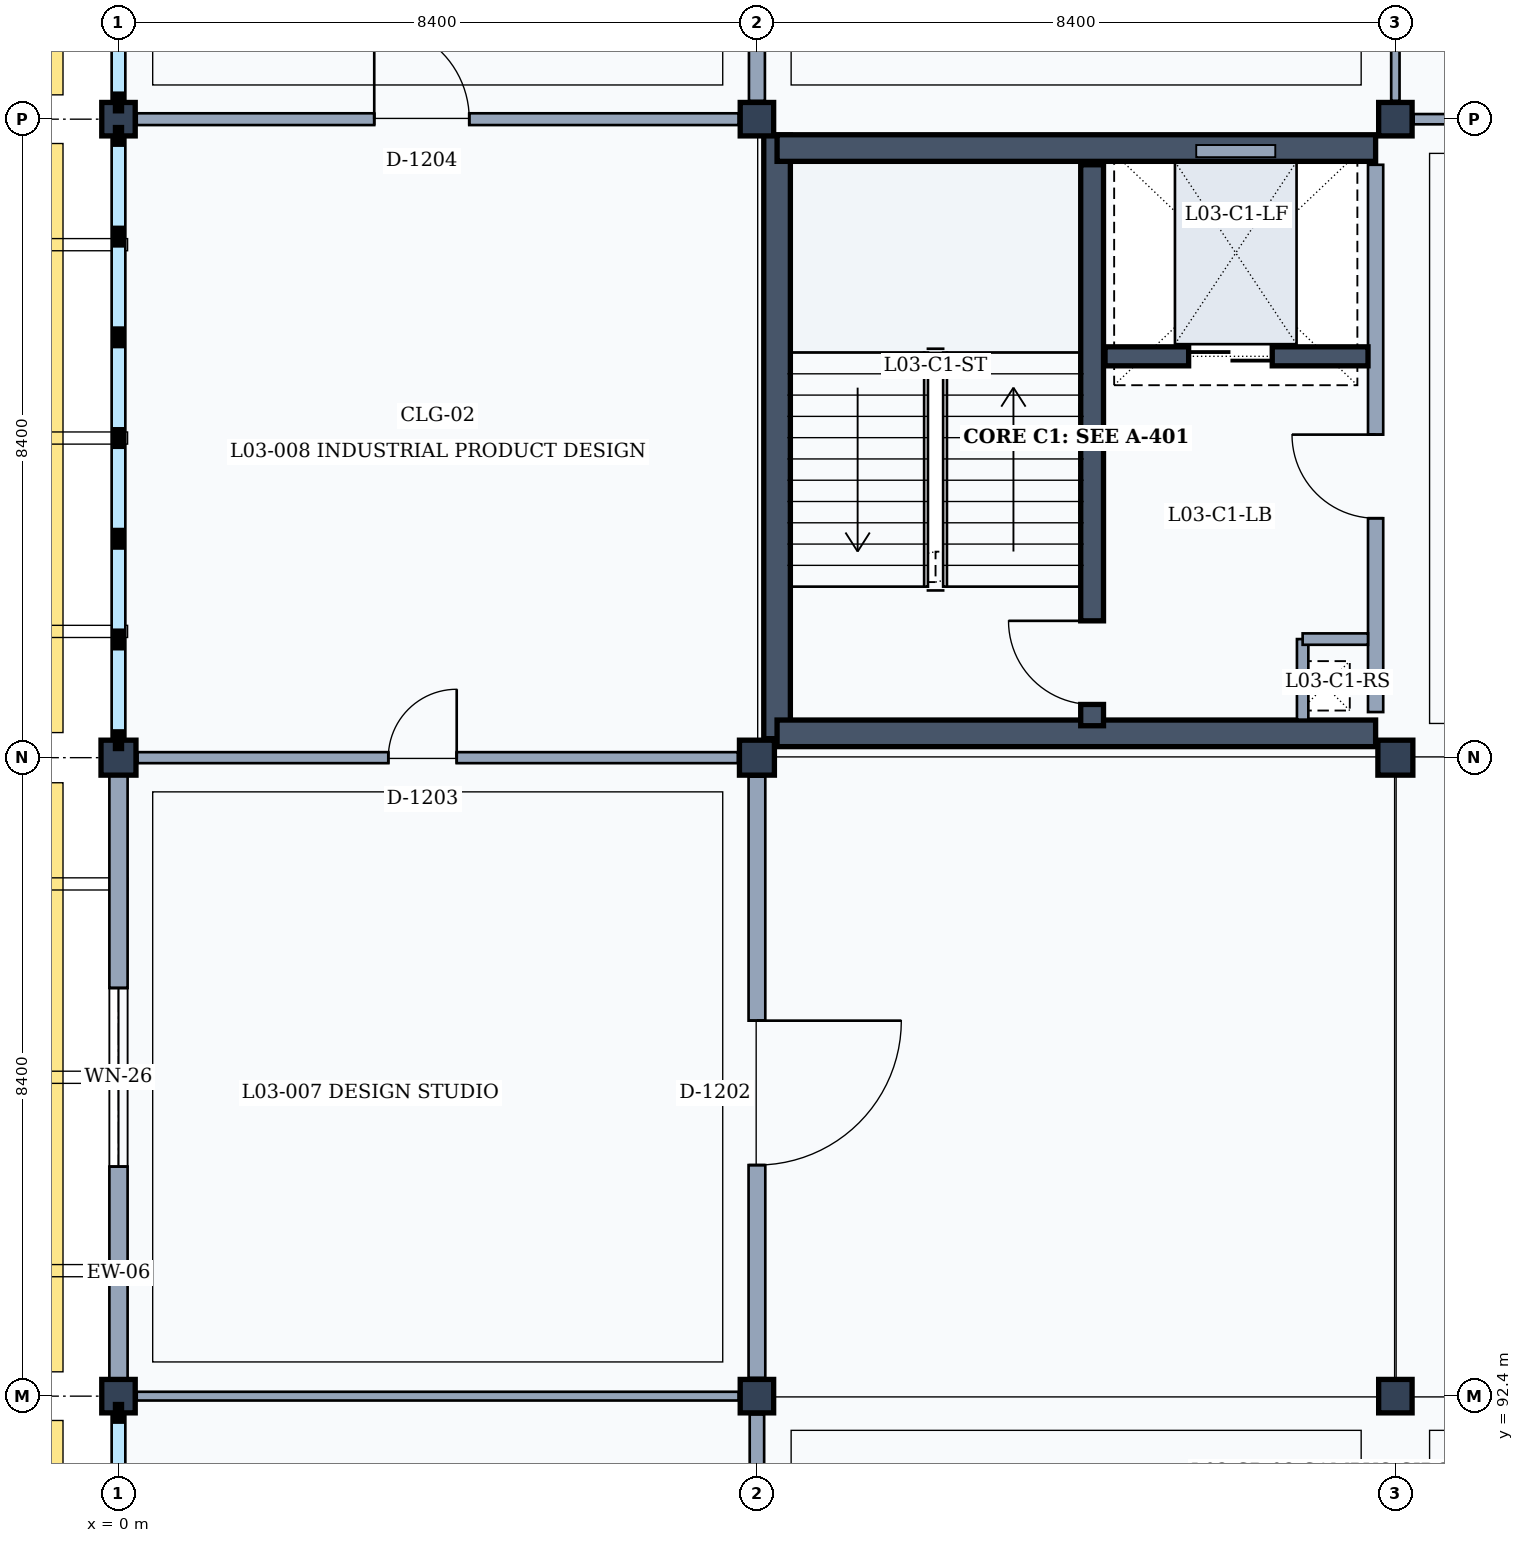
"""IFC4 building model, lengths in metres.
Left out: names, types, materials, properties, quantities, classifications, styles, units other than length and angle.
Written with IfcOpenShell. Run it as: python <this file> out.ifc"""

import sys

from ifc_helpers import new_model, si_unit, direction, frame, frame_2d, origin, origin_2d, place, context, subcontext, project, spatial, rectangle, extrude, element, fill, save


model = new_model("IFC4")
c1 = context("Model", 3, precision=1e-05, world=origin(), true_north=direction((0.0, 1.0)))
c2 = subcontext(c1, "Body", "Model", "MODEL_VIEW")
j1 = project(units=[si_unit("LENGTHUNIT", "METRE"), si_unit("PLANEANGLEUNIT", "RADIAN")], contexts=[c1])
p1 = place(None, origin())
s1 = spatial("IfcSite", under=j1, at=p1, CompositionType="ELEMENT")
p2 = place(p1, origin())
s2 = spatial("IfcBuilding", under=s1, at=p2, CompositionType="ELEMENT")
p3 = place(p2, frame((0.0, 0.0, 13.8)))
s3 = spatial("IfcBuildingStorey", under=s2, at=p3, CompositionType="ELEMENT", Elevation=13.8)
p4 = place(p3, frame((0.0, 92.4, 0.0), z_axis=(0.0, 0.0, 1.0), x_axis=(1.0, 0.0, 0.0)))
e1 = element("IfcColumn", 1, at=p4, inside=s3, PredefinedType="COLUMN", context=c2, shape_type="SweptSolid", body=[
    extrude(rectangle(XDim=0.44, YDim=0.44, at=origin_2d()), origin(), (0.0, 0.0, 1.0), 4.2),
])
p5 = place(p3, frame((0.0, 100.8, 0.0), z_axis=(0.0, 0.0, 1.0), x_axis=(1.0, 0.0, 0.0)))
e2 = element("IfcColumn", 2, at=p5, inside=s3, PredefinedType="COLUMN", context=c2, shape_type="SweptSolid", body=[
    extrude(rectangle(XDim=0.46, YDim=0.46, at=origin_2d()), origin(), (0.0, 0.0, 1.0), 4.2),
])
for number, where, z_axis, x_axis in (
    (3, (0.0, 109.2, 0.0), (0.0, 0.0, 1.0), (1.0, 0.0, 0.0)),
    (4, (8.4, 92.4, 0.0), (0.0, 0.0, 1.0), (1.0, 0.0, 0.0)),
):
    element("IfcColumn", number, at=place(p3, frame(where, z_axis=z_axis, x_axis=x_axis)), inside=s3, PredefinedType="COLUMN", context=c2, shape_type="SweptSolid", body=[
        extrude(rectangle(XDim=0.44, YDim=0.44, at=origin_2d()), origin(), (0.0, 0.0, 1.0), 4.2),
    ])
p6 = place(p3, frame((8.4, 100.8, 0.0), z_axis=(0.0, 0.0, 1.0), x_axis=(1.0, 0.0, 0.0)))
e5 = element("IfcColumn", 5, at=p6, inside=s3, PredefinedType="COLUMN", context=c2, shape_type="SweptSolid", body=[
    extrude(rectangle(XDim=0.46, YDim=0.46, at=origin_2d()), origin(), (0.0, 0.0, 1.0), 4.2),
])
for number, where, z_axis, x_axis in (
    (6, (8.4, 109.2, 0.0), (0.0, 0.0, 1.0), (1.0, 0.0, 0.0)),
    (7, (16.8, 92.4, 0.0), (0.0, 0.0, 1.0), (1.0, 0.0, 0.0)),
):
    element("IfcColumn", number, at=place(p3, frame(where, z_axis=z_axis, x_axis=x_axis)), inside=s3, PredefinedType="COLUMN", context=c2, shape_type="SweptSolid", body=[
        extrude(rectangle(XDim=0.44, YDim=0.44, at=origin_2d()), origin(), (0.0, 0.0, 1.0), 4.2),
    ])
p7 = place(p3, frame((16.8, 100.8, 0.0), z_axis=(0.0, 0.0, 1.0), x_axis=(1.0, 0.0, 0.0)))
e8 = element("IfcColumn", 8, at=p7, inside=s3, PredefinedType="COLUMN", context=c2, shape_type="SweptSolid", body=[
    extrude(rectangle(XDim=0.46, YDim=0.46, at=origin_2d()), origin(), (0.0, 0.0, 1.0), 4.2),
])
p8 = place(p3, frame((16.8, 109.2, 0.0), z_axis=(0.0, 0.0, 1.0), x_axis=(1.0, 0.0, 0.0)))
e9 = element("IfcColumn", 9, at=p8, inside=s3, PredefinedType="COLUMN", context=c2, shape_type="SweptSolid", body=[
    extrude(rectangle(XDim=0.44, YDim=0.44, at=origin_2d()), origin(), (0.0, 0.0, 1.0), 4.2),
])
p9 = place(p3, frame((0.0, 92.62, 0.0), z_axis=(0.0, 0.0, 1.0), x_axis=(0.0, 1.0, 0.0)))
e10 = element("IfcWall", 10, at=p9, inside=s3, PredefinedType="SOLIDWALL", context=c2, shape_type="SweptSolid", body=[
    extrude(rectangle(XDim=7.95, YDim=0.24, at=frame_2d((3.975, 0.0))), origin(), (0.0, 0.0, 1.0), 3.36),
])
p10 = place(p9, frame((2.8, 0.0, 0.9)))
e11 = element("IfcOpeningElement", 11, at=p10, cuts=e10, PredefinedType="OPENING", context=c2, shape_type="SweptSolid", body=[
    extrude(rectangle(XDim=2.35, YDim=1.95, at=frame_2d((1.175, 0.975))), frame((0.0, 0.13, 0.0), z_axis=(0.0, -1.0, 0.0), x_axis=(1.0, 0.0, 0.0)), (0.0, 0.0, 1.0), 0.26),
])
p11 = place(p3, frame((8.665, 101.05, 0.0), z_axis=(0.0, 0.0, 1.0), x_axis=(0.0, 1.0, 0.0)))
e12 = element("IfcWall", 12, at=p11, inside=s3, PredefinedType="SHEAR", context=c2, shape_type="SweptSolid", body=[
    extrude(rectangle(XDim=7.94, YDim=0.35, at=frame_2d((3.97, 0.0))), origin(), (0.0, 0.0, 1.0), 3.98),
])
p12 = place(p3, frame((8.665, 108.82, 0.0), z_axis=(0.0, 0.0, 1.0), x_axis=(1.0, 0.0, 0.0)))
e13 = element("IfcWall", 13, at=p12, inside=s3, PredefinedType="SHEAR", context=c2, shape_type="SweptSolid", body=[
    extrude(rectangle(XDim=7.875, YDim=0.35, at=frame_2d((3.938, 0.0))), origin(), (0.0, 0.0, 1.0), 3.98),
])
p13 = place(p3, frame((16.54, 108.6, 0.0), z_axis=(0.0, 0.0, 1.0), x_axis=(0.0, -1.0, 0.0)))
e14 = element("IfcWall", 14, at=p13, inside=s3, PredefinedType="PARTITIONING", context=c2, shape_type="SweptSolid", body=[
    extrude(rectangle(XDim=7.2, YDim=0.2, at=frame_2d((3.6, 0.0))), origin(), (0.0, 0.0, 1.0), 3.32),
])
p14 = place(p13, frame((3.55, 0.0, 0.0)))
e15 = element("IfcOpeningElement", 15, at=p14, cuts=e14, PredefinedType="OPENING", context=c2, shape_type="SweptSolid", body=[
    extrude(rectangle(XDim=1.1, YDim=2.15, at=frame_2d((0.55, 1.075))), frame((0.0, 0.11, 0.0), z_axis=(0.0, -1.0, 0.0), x_axis=(1.0, 0.0, 0.0)), (0.0, 0.0, 1.0), 0.22),
])
p15 = place(p3, frame((16.54, 101.12, 0.0), z_axis=(0.0, 0.0, 1.0), x_axis=(-1.0, 0.0, 0.0)))
e16 = element("IfcWall", 16, at=p15, inside=s3, PredefinedType="SHEAR", context=c2, shape_type="SweptSolid", body=[
    extrude(rectangle(XDim=7.875, YDim=0.35, at=frame_2d((3.938, 0.0))), origin(), (0.0, 0.0, 1.0), 3.98),
])
p16 = place(p3, frame((12.81, 101.22, 0.0), z_axis=(0.0, 0.0, 1.0), x_axis=(0.0, 1.0, 0.0)))
e17 = element("IfcWall", 17, at=p16, inside=s3, PredefinedType="SHEAR", context=c2, shape_type="SweptSolid", body=[
    extrude(rectangle(XDim=7.38, YDim=0.3, at=frame_2d((3.69, 0.0))), origin(), (0.0, 0.0, 1.0), 3.98),
])
p17 = place(p16, frame((0.28, 0.0, 0.0)))
e18 = element("IfcOpeningElement", 18, at=p17, cuts=e17, PredefinedType="OPENING", context=c2, shape_type="SweptSolid", body=[
    extrude(rectangle(XDim=1.1, YDim=2.15, at=frame_2d((0.55, 1.075))), frame((0.0, 0.16, 0.0), z_axis=(0.0, -1.0, 0.0), x_axis=(1.0, 0.0, 0.0)), (0.0, 0.0, 1.0), 0.32),
])
p18 = place(p3, frame((15.58, 102.36, 0.0), z_axis=(0.0, 0.0, 1.0), x_axis=(0.0, -1.0, 0.0)))
e19 = element("IfcWall", 19, at=p18, inside=s3, PredefinedType="PARTITIONING", context=c2, shape_type="SweptSolid", body=[
    extrude(rectangle(XDim=1.06, YDim=0.15, at=frame_2d((0.53, 0.0))), origin(), (0.0, 0.0, 1.0), 3.32),
])
p19 = place(p3, frame((15.58, 102.36, 0.0), z_axis=(0.0, 0.0, 1.0), x_axis=(1.0, 0.0, 0.0)))
e20 = element("IfcWall", 20, at=p19, inside=s3, PredefinedType="PARTITIONING", context=c2, shape_type="SweptSolid", body=[
    extrude(rectangle(XDim=0.86, YDim=0.15, at=frame_2d((0.43, 0.0))), origin(), (0.0, 0.0, 1.0), 3.32),
])
p20 = place(p3, frame((12.98, 106.08, 0.0), z_axis=(0.0, 0.0, 1.0), x_axis=(1.0, 0.0, 0.0)))
e21 = element("IfcWall", 21, at=p20, inside=s3, PredefinedType="SHEAR", context=c2, shape_type="SweptSolid", body=[
    extrude(rectangle(XDim=3.46, YDim=0.25, at=frame_2d((1.73, 0.0))), origin(), (0.0, 0.0, 1.0), 3.98),
])
p21 = place(p20, frame((1.1, 0.0, 0.0)))
e22 = element("IfcOpeningElement", 22, at=p21, cuts=e21, PredefinedType="OPENING", context=c2, shape_type="SweptSolid", body=[
    extrude(rectangle(XDim=1.1, YDim=2.15, at=frame_2d((0.55, 1.075))), frame((0.0, 0.135, 0.0), z_axis=(0.0, -1.0, 0.0), x_axis=(1.0, 0.0, 0.0)), (0.0, 0.0, 1.0), 0.27),
])
p22 = place(p3, frame((8.4, 84.25, 0.0), z_axis=(0.0, 0.0, 1.0), x_axis=(0.0, 1.0, 0.0)))
e23 = element("IfcWall", 23, at=p22, inside=s3, PredefinedType="PARTITIONING", context=c2, shape_type="SweptSolid", body=[
    extrude(rectangle(XDim=7.91, YDim=0.19, at=frame_2d((3.955, 0.0))), origin(), (0.0, 0.0, 1.0), 3.32),
])
p23 = place(p22, frame((2.9, 0.0, 0.0)))
e24 = element("IfcOpeningElement", 24, at=p23, cuts=e23, PredefinedType="OPENING", context=c2, shape_type="SweptSolid", body=[
    extrude(rectangle(XDim=1.7, YDim=2.3, at=frame_2d((0.85, 1.15))), frame((0.0, 0.105, 0.0), z_axis=(0.0, -1.0, 0.0), x_axis=(1.0, 0.0, 0.0)), (0.0, 0.0, 1.0), 0.21),
])
p24 = place(p3, frame((0.24, 92.4, 0.0), z_axis=(0.0, 0.0, 1.0), x_axis=(1.0, 0.0, 0.0)))
e25 = element("IfcWall", 25, at=p24, inside=s3, PredefinedType="PARTITIONING", context=c2, shape_type="SweptSolid", body=[
    extrude(rectangle(XDim=7.92, YDim=0.115, at=frame_2d((3.96, 0.0))), origin(), (0.0, 0.0, 1.0), 3.32),
])
p25 = place(p3, frame((8.4, 92.64, 0.0), z_axis=(0.0, 0.0, 1.0), x_axis=(0.0, 1.0, 0.0)))
e26 = element("IfcWall", 26, at=p25, inside=s3, PredefinedType="PARTITIONING", context=c2, shape_type="SweptSolid", body=[
    extrude(rectangle(XDim=7.91, YDim=0.22, at=frame_2d((3.955, 0.0))), origin(), (0.0, 0.0, 1.0), 3.32),
])
p26 = place(p25, frame((2.8, 0.0, 0.0)))
e27 = element("IfcOpeningElement", 27, at=p26, cuts=e26, PredefinedType="OPENING", context=c2, shape_type="SweptSolid", body=[
    extrude(rectangle(XDim=1.9, YDim=2.4, at=frame_2d((0.95, 1.2))), frame((0.0, 0.12, 0.0), z_axis=(0.0, -1.0, 0.0), x_axis=(1.0, 0.0, 0.0)), (0.0, 0.0, 1.0), 0.24),
])
p27 = place(p3, frame((0.25, 100.8, 0.0), z_axis=(0.0, 0.0, 1.0), x_axis=(1.0, 0.0, 0.0)))
e28 = element("IfcWall", 28, at=p27, inside=s3, PredefinedType="PARTITIONING", context=c2, shape_type="SweptSolid", body=[
    extrude(rectangle(XDim=7.9, YDim=0.145, at=frame_2d((3.95, 0.0))), origin(), (0.0, 0.0, 1.0), 3.32),
])
p28 = place(p27, frame((3.3, 0.0, 0.0)))
e29 = element("IfcOpeningElement", 29, at=p28, cuts=e28, PredefinedType="OPENING", context=c2, shape_type="SweptSolid", body=[
    extrude(rectangle(XDim=0.9, YDim=2.1, at=frame_2d((0.45, 1.05))), frame((0.0, 0.083, 0.0), z_axis=(0.0, -1.0, 0.0), x_axis=(1.0, 0.0, 0.0)), (0.0, 0.0, 1.0), 0.165),
])
p29 = place(p3, frame((0.24, 109.2, 0.0), z_axis=(0.0, 0.0, 1.0), x_axis=(1.0, 0.0, 0.0)))
e30 = element("IfcWall", 30, at=p29, inside=s3, PredefinedType="PARTITIONING", context=c2, shape_type="SweptSolid", body=[
    extrude(rectangle(XDim=7.92, YDim=0.155, at=frame_2d((3.96, 0.0))), origin(), (0.0, 0.0, 1.0), 3.32),
])
p30 = place(p29, frame((3.125, 0.0, 0.0)))
e31 = element("IfcOpeningElement", 31, at=p30, cuts=e30, PredefinedType="OPENING", context=c2, shape_type="SweptSolid", body=[
    extrude(rectangle(XDim=1.25, YDim=2.3, at=frame_2d((0.625, 1.15))), frame((0.0, 0.087, 0.0), z_axis=(0.0, -1.0, 0.0), x_axis=(1.0, 0.0, 0.0)), (0.0, 0.0, 1.0), 0.175),
])
p31 = place(p3, frame((8.4, 109.44, 0.0), z_axis=(0.0, 0.0, 1.0), x_axis=(0.0, 1.0, 0.0)))
e32 = element("IfcWall", 32, at=p31, inside=s3, PredefinedType="PARTITIONING", context=c2, shape_type="SweptSolid", body=[
    extrude(rectangle(XDim=7.91, YDim=0.21, at=frame_2d((3.955, 0.0))), origin(), (0.0, 0.0, 1.0), 3.32),
])
p32 = place(p3, frame((16.8, 109.44, 0.0), z_axis=(0.0, 0.0, 1.0), x_axis=(0.0, 1.0, 0.0)))
e33 = element("IfcWall", 33, at=p32, inside=s3, PredefinedType="PARTITIONING", context=c2, shape_type="SweptSolid", body=[
    extrude(rectangle(XDim=7.91, YDim=0.11, at=frame_2d((3.955, 0.0))), origin(), (0.0, 0.0, 1.0), 3.32),
])
p33 = place(p32, frame((3.15, 0.0, 0.0)))
e34 = element("IfcOpeningElement", 34, at=p33, cuts=e33, PredefinedType="OPENING", context=c2, shape_type="SweptSolid", body=[
    extrude(rectangle(XDim=1.2, YDim=2.2, at=frame_2d((0.6, 1.1))), frame((0.0, 0.065, 0.0), z_axis=(0.0, -1.0, 0.0), x_axis=(1.0, 0.0, 0.0)), (0.0, 0.0, 1.0), 0.13),
])
p34 = place(p3, frame((17.04, 109.2, 0.0), z_axis=(0.0, 0.0, 1.0), x_axis=(1.0, 0.0, 0.0)))
e35 = element("IfcWall", 35, at=p34, inside=s3, PredefinedType="PARTITIONING", context=c2, shape_type="SweptSolid", body=[
    extrude(rectangle(XDim=7.92, YDim=0.135, at=frame_2d((3.96, 0.0))), origin(), (0.0, 0.0, 1.0), 3.32),
])
p35 = place(p34, frame((2.8, 0.0, 0.0)))
e36 = element("IfcOpeningElement", 36, at=p35, cuts=e35, PredefinedType="OPENING", context=c2, shape_type="SweptSolid", body=[
    extrude(rectangle(XDim=1.9, YDim=2.4, at=frame_2d((0.95, 1.2))), frame((0.0, 0.077, 0.0), z_axis=(0.0, -1.0, 0.0), x_axis=(1.0, 0.0, 0.0)), (0.0, 0.0, 1.0), 0.155),
])
p36 = place(p10, origin())
e37 = element("IfcWindow", 37, at=p36, inside=s3, PartitioningType="SINGLE_PANEL", PredefinedType="WINDOW", context=c2, shape_type="SweptSolid", body=[
    extrude(rectangle(XDim=2.35, YDim=1.95, at=frame_2d((1.175, 0.975))), frame((0.0, 0.03, 0.0), z_axis=(0.0, -1.0, 0.0), x_axis=(1.0, 0.0, 0.0)), (0.0, 0.0, 1.0), 0.06),
])
fill(e11, e37)
p37 = place(p14, frame((1.1, 0.0, 0.0), z_axis=(0.0, 0.0, 1.0), x_axis=(-1.0, 0.0, 0.0)))
e38 = element("IfcDoor", 38, at=p37, inside=s3, OperationType="SINGLE_SWING_RIGHT", PredefinedType="DOOR", context=c2, shape_type="SweptSolid", body=[
    extrude(rectangle(XDim=1.1, YDim=2.15, at=frame_2d((0.55, 1.075))), frame((0.0, 0.025, 0.0), z_axis=(0.0, -1.0, 0.0), x_axis=(1.0, 0.0, 0.0)), (0.0, 0.0, 1.0), 0.05),
])
fill(e15, e38)
p38 = place(p17, origin())
e39 = element("IfcDoor", 39, at=p38, inside=s3, OperationType="SINGLE_SWING_RIGHT", PredefinedType="DOOR", context=c2, shape_type="SweptSolid", body=[
    extrude(rectangle(XDim=1.1, YDim=2.15, at=frame_2d((0.55, 1.075))), frame((0.0, 0.025, 0.0), z_axis=(0.0, -1.0, 0.0), x_axis=(1.0, 0.0, 0.0)), (0.0, 0.0, 1.0), 0.05),
])
fill(e18, e39)
p39 = place(p21, origin())
e40 = element("IfcDoor", 40, at=p39, inside=s3, OperationType="DOUBLE_DOOR_SLIDING", PredefinedType="DOOR", context=c2, shape_type="SweptSolid", body=[
    extrude(rectangle(XDim=1.1, YDim=2.15, at=frame_2d((0.55, 1.075))), frame((0.0, 0.025, 0.0), z_axis=(0.0, -1.0, 0.0), x_axis=(1.0, 0.0, 0.0)), (0.0, 0.0, 1.0), 0.05),
])
fill(e22, e40)
p40 = place(p26, frame((1.9, 0.0, 0.0), z_axis=(0.0, 0.0, 1.0), x_axis=(-1.0, 0.0, 0.0)))
e41 = element("IfcDoor", 41, at=p40, inside=s3, OperationType="SINGLE_SWING_LEFT", PredefinedType="DOOR", context=c2, shape_type="SweptSolid", body=[
    extrude(rectangle(XDim=1.9, YDim=2.4, at=frame_2d((0.95, 1.2))), frame((0.0, 0.025, 0.0), z_axis=(0.0, -1.0, 0.0), x_axis=(1.0, 0.0, 0.0)), (0.0, 0.0, 1.0), 0.05),
])
fill(e27, e41)
p41 = place(p28, origin())
e42 = element("IfcDoor", 42, at=p41, inside=s3, OperationType="SINGLE_SWING_RIGHT", PredefinedType="DOOR", context=c2, shape_type="SweptSolid", body=[
    extrude(rectangle(XDim=0.9, YDim=2.1, at=frame_2d((0.45, 1.05))), frame((0.0, 0.025, 0.0), z_axis=(0.0, -1.0, 0.0), x_axis=(1.0, 0.0, 0.0)), (0.0, 0.0, 1.0), 0.05),
])
fill(e29, e42)
p42 = place(p30, origin())
e43 = element("IfcDoor", 43, at=p42, inside=s3, OperationType="SINGLE_SWING_LEFT", PredefinedType="DOOR", context=c2, shape_type="SweptSolid", body=[
    extrude(rectangle(XDim=1.25, YDim=2.3, at=frame_2d((0.625, 1.15))), frame((0.0, 0.025, 0.0), z_axis=(0.0, -1.0, 0.0), x_axis=(1.0, 0.0, 0.0)), (0.0, 0.0, 1.0), 0.05),
])
fill(e31, e43)
save(model, sys.argv[1])
